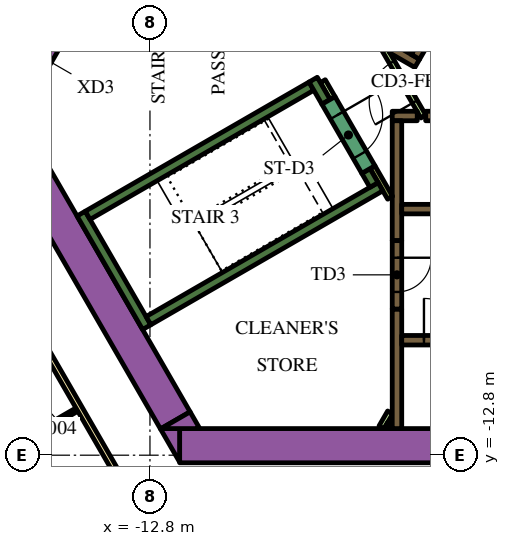
"""IFC4 building model, lengths in metres.
Left out: names, types, materials, properties, quantities, classifications, styles, units other than length and angle.
Written with IfcOpenShell. Run it as: python <this file> out.ifc"""

import sys

from ifc_helpers import new_model, si_unit, direction, frame, frame_2d, origin, place, context, subcontext, project, spatial, polyline, rectangle, outline, extrude, element, fill, save


model = new_model("IFC4")
c1 = context("Model", 3, precision=1e-05, world=origin(), true_north=direction((0.0, 1.0)))
c2 = subcontext(c1, "Body", "Model", "MODEL_VIEW")
j1 = project(units=[si_unit("LENGTHUNIT", "METRE"), si_unit("PLANEANGLEUNIT", "RADIAN")], contexts=[c1])
p1 = place(None, origin())
s1 = spatial("IfcSite", under=j1, at=p1, CompositionType="ELEMENT")
p2 = place(p1, origin())
s2 = spatial("IfcBuilding", under=s1, at=p2, CompositionType="ELEMENT")
p3 = place(p2, frame((0.0, 0.0, 95.4)))
s3 = spatial("IfcBuildingStorey", under=s2, at=p3, CompositionType="ELEMENT", Elevation=95.4)
p4 = place(p3, frame((-12.019, -12.55, 0.0), z_axis=(0.0, 0.0, 1.0), x_axis=(1.0, 0.0, 0.0)))
e1 = element("IfcWall", 1, at=p4, inside=s3, PredefinedType="SOLIDWALL", context=c2, shape_type="SweptSolid", body=[
    extrude(rectangle(XDim=21.63, YDim=0.9, at=frame_2d((10.815, 0.0))), origin(), (0.0, 0.0, 1.0), 3.9),
])
p5 = place(p3, origin())
e2 = element("IfcWall", 2, at=p5, inside=s3, PredefinedType="SOLIDWALL", context=c2, shape_type="SweptSolid", body=[
    extrude(outline(polyline([(-12.529, -12.1), (-12.021, -12.1), (-12.021, -12.98), (-12.529, -12.1)])), origin(), (0.0, 0.0, 1.0), 3.9),
])
p6 = place(p3, frame((-12.134, -11.883, 0.0), z_axis=(0.0, 0.0, 1.0), x_axis=(-0.500005339912, 0.866022320763, 0.0)))
e3 = element("IfcWall", 3, at=p6, inside=s3, PredefinedType="SOLIDWALL", context=c2, shape_type="SweptSolid", body=[
    extrude(rectangle(XDim=9.488, YDim=0.9, at=frame_2d((4.744, 0.0))), origin(), (0.0, 0.0, 1.0), 3.9),
])
e4 = element("IfcWall", 4, at=p5, inside=s3, PredefinedType="SOLIDWALL", context=c2, shape_type="SweptSolid", body=[
    extrude(outline(polyline([(-11.489, -12.1), (-12.505, -12.1), (-11.743, -11.66), (-11.489, -12.1)])), origin(), (0.0, 0.0, 1.0), 3.9),
])
p7 = place(p3, frame((-12.885, -9.431, 0.0), z_axis=(0.0, 0.0, 1.0), x_axis=(-0.500020560727, 0.866013532718, 0.0)))
e5 = element("IfcWall", 5, at=p7, inside=s3, PredefinedType="SOLIDWALL", context=c2, shape_type="SweptSolid", body=[
    extrude(rectangle(XDim=3.45, YDim=0.25, at=frame_2d((1.725, 0.0))), origin(), (0.0, 0.0, 1.0), 3.9),
])
p8 = place(p3, frame((-14.44, -6.49, 0.0), z_axis=(0.0, 0.0, 1.0), x_axis=(0.866022966069, 0.500004222222, 0.0)))
e6 = element("IfcWall", 6, at=p8, inside=s3, PredefinedType="SOLIDWALL", context=c2, shape_type="SweptSolid", body=[
    extrude(rectangle(XDim=6.8, YDim=0.25, at=frame_2d((3.4, 0.0))), origin(), (0.0, 0.0, 1.0), 3.9),
])
p9 = place(p3, frame((-8.168, -3.503, 0.0), z_axis=(0.0, 0.0, 1.0), x_axis=(-0.499952099219, 0.866053057547, 0.0)))
e7 = element("IfcWall", 7, at=p9, inside=s3, PredefinedType="SOLIDWALL", context=c2, shape_type="SweptSolid", body=[
    extrude(rectangle(XDim=0.675, YDim=0.25, at=frame_2d((0.337, 0.0))), origin(), (0.0, 0.0, 1.0), 3.9),
])
p10 = place(p3, frame((-12.84, -9.261, 0.0), z_axis=(0.0, 0.0, 1.0), x_axis=(0.866016039709, 0.500016218704, 0.0)))
e8 = element("IfcWall", 8, at=p10, inside=s3, PredefinedType="SOLIDWALL", context=c2, shape_type="SweptSolid", body=[
    extrude(rectangle(XDim=7.05, YDim=0.25, at=frame_2d((3.525, 0.0))), origin(), (0.0, 0.0, 1.0), 3.9),
])
p11 = place(p3, frame((-6.905, -5.69, 0.0), z_axis=(0.0, 0.0, 1.0), x_axis=(-0.500402024738, 0.865793170242, 0.0)))
e9 = element("IfcWall", 9, at=p11, inside=s3, PredefinedType="SOLIDWALL", context=c2, shape_type="SweptSolid", body=[
    extrude(rectangle(XDim=0.425, YDim=0.25, at=frame_2d((0.212, 0.0))), origin(), (0.0, 0.0, 1.0), 3.9),
])
p12 = place(p3, frame((-6.3, -12.1, 0.0), z_axis=(0.0, 0.0, 1.0), x_axis=(0.0, 1.0, 0.0)))
e10 = element("IfcWall", 10, at=p12, inside=s3, PredefinedType="SOLIDWALL", context=c2, shape_type="SweptSolid", body=[
    extrude(rectangle(XDim=3.146, YDim=0.25, at=frame_2d((1.573, 0.0))), origin(), (0.0, 0.0, 1.0), 3.9),
])
p13 = place(p3, frame((-5.545, -3.875, 0.0), z_axis=(0.0, 0.0, 1.0), x_axis=(1.0, 0.0, 0.0)))
e11 = element("IfcWall", 11, at=p13, inside=s3, PredefinedType="SOLIDWALL", context=c2, shape_type="SweptSolid", body=[
    extrude(rectangle(XDim=11.97, YDim=0.25, at=frame_2d((5.985, 0.0))), origin(), (0.0, 0.0, 1.0), 3.9),
])
p14 = place(p3, frame((-6.425, -3.875, 0.0), z_axis=(0.0, 0.0, 1.0), x_axis=(1.0, 0.0, 0.0)))
e12 = element("IfcWall", 12, at=p14, inside=s3, PredefinedType="SOLIDWALL", context=c2, shape_type="SweptSolid", body=[
    extrude(rectangle(XDim=0.658, YDim=0.25, at=frame_2d((0.329, 0.0))), origin(), (0.0, 0.0, 1.0), 3.9),
])
p15 = place(p3, frame((-6.3, -4.0, 0.0), z_axis=(0.0, 0.0, 1.0), x_axis=(0.0, -1.0, 0.0)))
e13 = element("IfcWall", 13, at=p15, inside=s3, PredefinedType="SOLIDWALL", context=c2, shape_type="SweptSolid", body=[
    extrude(rectangle(XDim=3.154, YDim=0.25, at=frame_2d((1.577, 0.0))), origin(), (0.0, 0.0, 1.0), 3.9),
])
e14 = element("IfcWall", 14, at=p5, inside=s3, PredefinedType="SOLIDWALL", context=c2, shape_type="SweptSolid", body=[
    extrude(outline(polyline([(-5.922, -2.257), (-5.922, -2.257), (-5.705, -2.382), (-5.83, -2.598), (-6.483, -2.221), (-6.591, -2.033), (-6.591, -2.033), (-6.7, -2.096), (-7.952, -1.373), (-7.827, -1.156), (-5.922, -2.257)])), origin(), (0.0, 0.0, 1.0), 3.9),
])
p16 = place(p3, frame((-6.708, -12.068, 0.0), z_axis=(0.0, 0.0, 1.0), x_axis=(0.500000789788, 0.8660249478, 0.0)))
e15 = element("IfcWall", 15, at=p16, inside=s3, PredefinedType="PARTITIONING", context=c2, shape_type="SweptSolid", body=[
    extrude(rectangle(XDim=0.456, YDim=0.15, at=frame_2d((0.228, 0.0))), origin(), (0.0, 0.0, 1.0), 2.75),
])
p17 = place(p3, frame((-6.534, -12.068, 0.0), z_axis=(0.0, 0.0, 1.0), x_axis=(0.500240224089, 0.865886665912, 0.0)))
e16 = element("IfcWall", 16, at=p17, inside=s3, PredefinedType="PARTITIONING", context=c2, shape_type="SweptSolid", body=[
    extrude(rectangle(XDim=0.109, YDim=0.15, at=frame_2d((0.054, 0.0))), origin(), (0.0, 0.0, 1.0), 2.75),
])
p18 = place(p3, frame((-6.48, -6.027, 0.0), z_axis=(0.0, 0.0, 1.0), x_axis=(-0.499927229454, 0.866067413802, 0.0)))
e17 = element("IfcWall", 17, at=p18, inside=s3, PredefinedType="PARTITIONING", context=c2, shape_type="SweptSolid", body=[
    extrude(rectangle(XDim=0.929, YDim=0.15, at=frame_2d((0.464, 0.0))), origin(), (0.0, 0.0, 1.0), 3.9),
])
p19 = place(p3, frame((-8.252, -2.958, 0.0), z_axis=(0.0, 0.0, 1.0), x_axis=(0.500174715838, -0.865924508047, 0.0)))
e18 = element("IfcWall", 18, at=p19, inside=s3, PredefinedType="PARTITIONING", context=c2, shape_type="SweptSolid", body=[
    extrude(rectangle(XDim=0.514, YDim=0.15, at=frame_2d((0.257, 0.0))), origin(), (0.0, 0.0, 1.0), 2.75),
])
p20 = place(p3, frame((-6.175, -9.775, 0.0), z_axis=(0.0, 0.0, 1.0), x_axis=(1.0, 0.0, 0.0)))
e19 = element("IfcWall", 19, at=p20, inside=s3, PredefinedType="SOLIDWALL", context=c2, shape_type="SweptSolid", body=[
    extrude(rectangle(XDim=12.35, YDim=0.25, at=frame_2d((6.175, 0.0))), origin(), (0.0, 0.0, 1.0), 3.9),
])
p21 = place(p20, frame((0.585, 0.0, 0.0)))
e20 = element("IfcOpeningElement", 20, at=p21, cuts=e19, PredefinedType="OPENING", context=c2, shape_type="SweptSolid", body=[
    extrude(rectangle(XDim=1.1, YDim=2.1, at=frame_2d((0.55, 1.05))), frame((0.0, 0.135, 0.0), z_axis=(0.0, -1.0, 0.0), x_axis=(1.0, 0.0, 0.0)), (0.0, 0.0, 1.0), 0.27),
])
p22 = place(p20, frame((3.105, 0.0, 0.0)))
e21 = element("IfcOpeningElement", 21, at=p22, cuts=e19, PredefinedType="OPENING", context=c2, shape_type="SweptSolid", body=[
    extrude(rectangle(XDim=1.1, YDim=2.1, at=frame_2d((0.55, 1.05))), frame((0.0, 0.135, 0.0), z_axis=(0.0, -1.0, 0.0), x_axis=(1.0, 0.0, 0.0)), (0.0, 0.0, 1.0), 0.27),
])
p23 = place(p20, frame((5.625, 0.0, 0.0)))
e22 = element("IfcOpeningElement", 22, at=p23, cuts=e19, PredefinedType="OPENING", context=c2, shape_type="SweptSolid", body=[
    extrude(rectangle(XDim=1.1, YDim=2.1, at=frame_2d((0.55, 1.05))), frame((0.0, 0.135, 0.0), z_axis=(0.0, -1.0, 0.0), x_axis=(1.0, 0.0, 0.0)), (0.0, 0.0, 1.0), 0.27),
])
p24 = place(p20, frame((8.145, 0.0, 0.0)))
e23 = element("IfcOpeningElement", 23, at=p24, cuts=e19, PredefinedType="OPENING", context=c2, shape_type="SweptSolid", body=[
    extrude(rectangle(XDim=1.1, YDim=2.1, at=frame_2d((0.55, 1.05))), frame((0.0, 0.135, 0.0), z_axis=(0.0, -1.0, 0.0), x_axis=(1.0, 0.0, 0.0)), (0.0, 0.0, 1.0), 0.27),
])
p25 = place(p20, frame((10.665, 0.0, 0.0)))
e24 = element("IfcOpeningElement", 24, at=p25, cuts=e19, PredefinedType="OPENING", context=c2, shape_type="SweptSolid", body=[
    extrude(rectangle(XDim=1.1, YDim=2.1, at=frame_2d((0.55, 1.05))), frame((0.0, 0.135, 0.0), z_axis=(0.0, -1.0, 0.0), x_axis=(1.0, 0.0, 0.0)), (0.0, 0.0, 1.0), 0.27),
])
p26 = place(p3, frame((-6.175, -6.325, 0.0), z_axis=(0.0, 0.0, 1.0), x_axis=(1.0, 0.0, 0.0)))
e25 = element("IfcWall", 25, at=p26, inside=s3, PredefinedType="SOLIDWALL", context=c2, shape_type="SweptSolid", body=[
    extrude(rectangle(XDim=12.35, YDim=0.25, at=frame_2d((6.175, 0.0))), origin(), (0.0, 0.0, 1.0), 3.9),
])
p27 = place(p26, frame((3.205, 0.0, 0.0)))
e26 = element("IfcOpeningElement", 26, at=p27, cuts=e25, PredefinedType="OPENING", context=c2, shape_type="SweptSolid", body=[
    extrude(rectangle(XDim=0.9, YDim=2.1, at=frame_2d((0.45, 1.05))), frame((0.0, 0.135, 0.0), z_axis=(0.0, -1.0, 0.0), x_axis=(1.0, 0.0, 0.0)), (0.0, 0.0, 1.0), 0.27),
])
p28 = place(p26, frame((8.145, 0.0, 0.0)))
e27 = element("IfcOpeningElement", 27, at=p28, cuts=e25, PredefinedType="OPENING", context=c2, shape_type="SweptSolid", body=[
    extrude(rectangle(XDim=1.1, YDim=2.1, at=frame_2d((0.55, 1.05))), frame((0.0, 0.135, 0.0), z_axis=(0.0, -1.0, 0.0), x_axis=(1.0, 0.0, 0.0)), (0.0, 0.0, 1.0), 0.27),
])
p29 = place(p26, frame((10.665, 0.0, 0.0)))
e28 = element("IfcOpeningElement", 28, at=p29, cuts=e25, PredefinedType="OPENING", context=c2, shape_type="SweptSolid", body=[
    extrude(rectangle(XDim=1.1, YDim=2.1, at=frame_2d((0.55, 1.05))), frame((0.0, 0.135, 0.0), z_axis=(0.0, -1.0, 0.0), x_axis=(1.0, 0.0, 0.0)), (0.0, 0.0, 1.0), 0.27),
])
p30 = place(p3, frame((-0.898, 6.194, 0.0), z_axis=(0.0, 0.0, 1.0), x_axis=(-0.499996202215, -0.866027596426, 0.0)))
e29 = element("IfcWall", 29, at=p30, inside=s3, PredefinedType="SOLIDWALL", context=c2, shape_type="SweptSolid", body=[
    extrude(rectangle(XDim=9.83, YDim=0.25, at=frame_2d((4.915, 0.0))), origin(), (0.0, 0.0, 1.0), 3.9),
])
p31 = place(p30, frame((0.585, 0.0, 0.0)))
e30 = element("IfcOpeningElement", 30, at=p31, cuts=e29, PredefinedType="OPENING", context=c2, shape_type="SweptSolid", body=[
    extrude(rectangle(XDim=1.1, YDim=2.1, at=frame_2d((0.55, 1.05))), frame((0.0, 0.135, 0.0), z_axis=(0.0, -1.0, 0.0), x_axis=(1.0, 0.0, 0.0)), (0.0, 0.0, 1.0), 0.27),
])
p32 = place(p30, frame((3.105, 0.0, 0.0)))
e31 = element("IfcOpeningElement", 31, at=p32, cuts=e29, PredefinedType="OPENING", context=c2, shape_type="SweptSolid", body=[
    extrude(rectangle(XDim=1.1, YDim=2.1, at=frame_2d((0.55, 1.05))), frame((0.0, 0.135, 0.0), z_axis=(0.0, -1.0, 0.0), x_axis=(1.0, 0.0, 0.0)), (0.0, 0.0, 1.0), 0.27),
])
p33 = place(p30, frame((5.625, 0.0, 0.0)))
e32 = element("IfcOpeningElement", 32, at=p33, cuts=e29, PredefinedType="OPENING", context=c2, shape_type="SweptSolid", body=[
    extrude(rectangle(XDim=1.1, YDim=2.1, at=frame_2d((0.55, 1.05))), frame((0.0, 0.135, 0.0), z_axis=(0.0, -1.0, 0.0), x_axis=(1.0, 0.0, 0.0)), (0.0, 0.0, 1.0), 0.27),
])
p34 = place(p30, frame((8.145, 0.0, 0.0)))
e33 = element("IfcOpeningElement", 33, at=p34, cuts=e29, PredefinedType="OPENING", context=c2, shape_type="SweptSolid", body=[
    extrude(rectangle(XDim=1.1, YDim=2.1, at=frame_2d((0.55, 1.05))), frame((0.0, 0.135, 0.0), z_axis=(0.0, -1.0, 0.0), x_axis=(1.0, 0.0, 0.0)), (0.0, 0.0, 1.0), 0.27),
])
p35 = place(p3, frame((-8.103, -3.466, 0.0), z_axis=(0.0, 0.0, 1.0), x_axis=(0.500078061341, -0.865980330357, 0.0)))
e34 = element("IfcWall", 34, at=p35, inside=s3, PredefinedType="SOLIDWALL", context=c2, shape_type="SweptSolid", body=[
    extrude(rectangle(XDim=2.1, YDim=0.4, at=frame_2d((1.05, 0.0))), origin(), (0.0, 0.0, 1.0), 3.9),
])
p36 = place(p35, frame((0.45, 0.0, 0.0)))
e35 = element("IfcOpeningElement", 35, at=p36, cuts=e34, PredefinedType="OPENING", context=c2, shape_type="SweptSolid", body=[
    extrude(rectangle(XDim=1.2, YDim=2.1, at=frame_2d((0.6, 1.05))), frame((0.0, 0.21, 0.0), z_axis=(0.0, -1.0, 0.0), x_axis=(1.0, 0.0, 0.0)), (0.0, 0.0, 1.0), 0.42),
])
p37 = place(p3, frame((-6.3, -7.154, 0.0), z_axis=(0.0, 0.0, 1.0), x_axis=(0.0, -1.0, 0.0)))
e36 = element("IfcWall", 36, at=p37, inside=s3, PredefinedType="SOLIDWALL", context=c2, shape_type="SweptSolid", body=[
    extrude(rectangle(XDim=1.8, YDim=0.25, at=frame_2d((0.9, 0.0))), origin(), (0.0, 0.0, 1.0), 3.9),
])
p38 = place(p37, frame((0.45, 0.0, 0.0)))
e37 = element("IfcOpeningElement", 37, at=p38, cuts=e36, PredefinedType="OPENING", context=c2, shape_type="SweptSolid", body=[
    extrude(rectangle(XDim=0.9, YDim=2.1, at=frame_2d((0.45, 1.05))), frame((0.0, 0.135, 0.0), z_axis=(0.0, -1.0, 0.0), x_axis=(1.0, 0.0, 0.0)), (0.0, 0.0, 1.0), 0.27),
])
p39 = place(p3, frame((-5.606, -3.89, 0.0), z_axis=(0.0, 0.0, 1.0), x_axis=(-0.500027713859, 0.866009402589, 0.0)))
e38 = element("IfcWall", 38, at=p39, inside=s3, PredefinedType="PARTITIONING", context=c2, shape_type="SweptSolid", body=[
    extrude(rectangle(XDim=2.1, YDim=0.15, at=frame_2d((1.05, 0.0))), origin(), (0.0, 0.0, 1.0), 2.75),
])
p40 = place(p39, frame((0.45, 0.0, 0.0)))
e39 = element("IfcOpeningElement", 39, at=p40, cuts=e38, PredefinedType="OPENING", context=c2, shape_type="SweptSolid", body=[
    extrude(rectangle(XDim=1.2, YDim=2.1, at=frame_2d((0.6, 1.05))), frame((0.0, 0.085, 0.0), z_axis=(0.0, -1.0, 0.0), x_axis=(1.0, 0.0, 0.0)), (0.0, 0.0, 1.0), 0.17),
])
p41 = place(p3, frame((-16.209, -2.976, 0.0), z_axis=(0.0, 0.0, 1.0), x_axis=(0.499954529098, 0.86605165483, 0.0)))
e40 = element("IfcWall", 40, at=p41, inside=s3, PredefinedType="SOLIDWALL", context=c2, shape_type="SweptSolid", body=[
    extrude(rectangle(XDim=1.7, YDim=0.9, at=frame_2d((0.85, 0.0))), origin(), (0.0, 0.0, 1.0), 3.9),
])
p42 = place(p41, frame((0.25, 0.0, 0.0)))
e41 = element("IfcOpeningElement", 41, at=p42, cuts=e40, PredefinedType="OPENING", context=c2, shape_type="SweptSolid", body=[
    extrude(rectangle(XDim=1.2, YDim=2.1, at=frame_2d((0.6, 1.05))), frame((0.0, 0.46, 0.0), z_axis=(0.0, -1.0, 0.0), x_axis=(1.0, 0.0, 0.0)), (0.0, 0.0, 1.0), 0.92),
])
p43 = place(p3, frame((-19.081, -3.9, 0.0), z_axis=(0.0, 0.0, 1.0), x_axis=(0.499998313975, 0.866026377209, 0.0)))
e42 = element("IfcWall", 42, at=p43, inside=s3, PredefinedType="PARTITIONING", context=c2, shape_type="SweptSolid", body=[
    extrude(rectangle(XDim=25.766, YDim=0.15, at=frame_2d((12.883, 0.0))), origin(), (0.0, 0.0, 1.0), 2.75),
])
p44 = place(p43, frame((19.306, 0.0, 0.0)))
e43 = element("IfcOpeningElement", 43, at=p44, cuts=e42, PredefinedType="OPENING", context=c2, shape_type="SweptSolid", body=[
    extrude(rectangle(XDim=1.0, YDim=2.1, at=frame_2d((0.5, 1.05))), frame((0.0, 0.085, 0.0), z_axis=(0.0, -1.0, 0.0), x_axis=(1.0, 0.0, 0.0)), (0.0, 0.0, 1.0), 0.17),
])
p45 = place(p43, frame((17.144, 0.0, 0.0)))
e44 = element("IfcOpeningElement", 44, at=p45, cuts=e42, PredefinedType="OPENING", context=c2, shape_type="SweptSolid", body=[
    extrude(rectangle(XDim=0.9, YDim=2.1, at=frame_2d((0.45, 1.05))), frame((0.0, 0.085, 0.0), z_axis=(0.0, -1.0, 0.0), x_axis=(1.0, 0.0, 0.0)), (0.0, 0.0, 1.0), 0.17),
])
p46 = place(p43, frame((9.955, 0.0, 0.0)))
e45 = element("IfcOpeningElement", 45, at=p46, cuts=e42, PredefinedType="OPENING", context=c2, shape_type="SweptSolid", body=[
    extrude(rectangle(XDim=1.1, YDim=2.1, at=frame_2d((0.55, 1.05))), frame((0.0, 0.085, 0.0), z_axis=(0.0, -1.0, 0.0), x_axis=(1.0, 0.0, 0.0)), (0.0, 0.0, 1.0), 0.17),
])
p47 = place(p43, frame((8.648, 0.0, 0.0)))
e46 = element("IfcOpeningElement", 46, at=p47, cuts=e42, PredefinedType="OPENING", context=c2, shape_type="SweptSolid", body=[
    extrude(rectangle(XDim=1.0, YDim=2.1, at=frame_2d((0.5, 1.05))), frame((0.0, 0.085, 0.0), z_axis=(0.0, -1.0, 0.0), x_axis=(1.0, 0.0, 0.0)), (0.0, 0.0, 1.0), 0.17),
])
p48 = place(p43, frame((1.553, 0.0, 0.0)))
e47 = element("IfcOpeningElement", 47, at=p48, cuts=e42, PredefinedType="OPENING", context=c2, shape_type="SweptSolid", body=[
    extrude(rectangle(XDim=0.9, YDim=2.1, at=frame_2d((0.45, 1.05))), frame((0.0, 0.085, 0.0), z_axis=(0.0, -1.0, 0.0), x_axis=(1.0, 0.0, 0.0)), (0.0, 0.0, 1.0), 0.17),
])
p49 = place(p3, frame((-12.918, -14.575, 0.0), z_axis=(0.0, 0.0, 1.0), x_axis=(-0.500009150678, 0.866020120573, 0.0)))
e48 = element("IfcWall", 48, at=p49, inside=s3, PredefinedType="PARTITIONING", context=c2, shape_type="SweptSolid", body=[
    extrude(rectangle(XDim=5.258, YDim=0.15, at=frame_2d((2.629, 0.0))), origin(), (0.0, 0.0, 1.0), 2.75),
])
p50 = place(p49, frame((0.18, 0.0, 0.0)))
e49 = element("IfcOpeningElement", 49, at=p50, cuts=e48, PredefinedType="OPENING", context=c2, shape_type="SweptSolid", body=[
    extrude(rectangle(XDim=1.0, YDim=2.1, at=frame_2d((0.5, 1.05))), frame((0.0, 0.085, 0.0), z_axis=(0.0, -1.0, 0.0), x_axis=(1.0, 0.0, 0.0)), (0.0, 0.0, 1.0), 0.17),
])
p51 = place(p3, frame((-16.974, -12.9, 0.0), z_axis=(0.0, 0.0, 1.0), x_axis=(0.865997922154, 0.500047596559, 0.0)))
e50 = element("IfcWall", 50, at=p51, inside=s3, PredefinedType="PARTITIONING", context=c2, shape_type="SweptSolid", body=[
    extrude(rectangle(XDim=2.6, YDim=0.1, at=frame_2d((1.3, 0.0))), origin(), (0.0, 0.0, 1.0), 2.75),
])
p52 = place(p51, frame((1.1, 0.0, 0.0)))
e51 = element("IfcOpeningElement", 51, at=p52, cuts=e50, PredefinedType="OPENING", context=c2, shape_type="SweptSolid", body=[
    extrude(rectangle(XDim=0.9, YDim=2.1, at=frame_2d((0.45, 1.05))), frame((0.0, 0.06, 0.0), z_axis=(0.0, -1.0, 0.0), x_axis=(1.0, 0.0, 0.0)), (0.0, 0.0, 1.0), 0.12),
])
p53 = place(p21, origin())
e52 = element("IfcDoor", 52, at=p53, inside=s3, OperationType="DOUBLE_DOOR_SLIDING", PredefinedType="DOOR", context=c2, shape_type="SweptSolid", body=[
    extrude(rectangle(XDim=1.1, YDim=2.1, at=frame_2d((0.55, 1.05))), frame((0.0, 0.025, 0.0), z_axis=(0.0, -1.0, 0.0), x_axis=(1.0, 0.0, 0.0)), (0.0, 0.0, 1.0), 0.05),
])
fill(e20, e52)
p54 = place(p36, origin())
e53 = element("IfcDoor", 53, at=p54, inside=s3, OperationType="SINGLE_SWING_LEFT", PredefinedType="DOOR", context=c2, shape_type="SweptSolid", body=[
    extrude(rectangle(XDim=1.2, YDim=2.1, at=frame_2d((0.6, 1.05))), frame((0.0, 0.025, 0.0), z_axis=(0.0, -1.0, 0.0), x_axis=(1.0, 0.0, 0.0)), (0.0, 0.0, 1.0), 0.05),
])
fill(e35, e53)
p55 = place(p38, origin())
e54 = element("IfcDoor", 54, at=p55, inside=s3, OperationType="SINGLE_SWING_LEFT", PredefinedType="DOOR", context=c2, shape_type="SweptSolid", body=[
    extrude(rectangle(XDim=0.9, YDim=2.1, at=frame_2d((0.45, 1.05))), frame((0.0, 0.025, 0.0), z_axis=(0.0, -1.0, 0.0), x_axis=(1.0, 0.0, 0.0)), (0.0, 0.0, 1.0), 0.05),
])
fill(e37, e54)
p56 = place(p40, origin())
e55 = element("IfcDoor", 55, at=p56, inside=s3, OperationType="SINGLE_SWING_LEFT", PredefinedType="DOOR", context=c2, shape_type="SweptSolid", body=[
    extrude(rectangle(XDim=1.2, YDim=2.1, at=frame_2d((0.6, 1.05))), frame((0.0, 0.025, 0.0), z_axis=(0.0, -1.0, 0.0), x_axis=(1.0, 0.0, 0.0)), (0.0, 0.0, 1.0), 0.05),
])
fill(e39, e55)
p57 = place(p52, origin())
e56 = element("IfcDoor", 56, at=p57, inside=s3, OperationType="SINGLE_SWING_LEFT", PredefinedType="DOOR", context=c2, shape_type="SweptSolid", body=[
    extrude(rectangle(XDim=0.9, YDim=2.1, at=frame_2d((0.45, 1.05))), frame((0.0, 0.025, 0.0), z_axis=(0.0, -1.0, 0.0), x_axis=(1.0, 0.0, 0.0)), (0.0, 0.0, 1.0), 0.05),
])
fill(e51, e56)
save(model, sys.argv[1])
